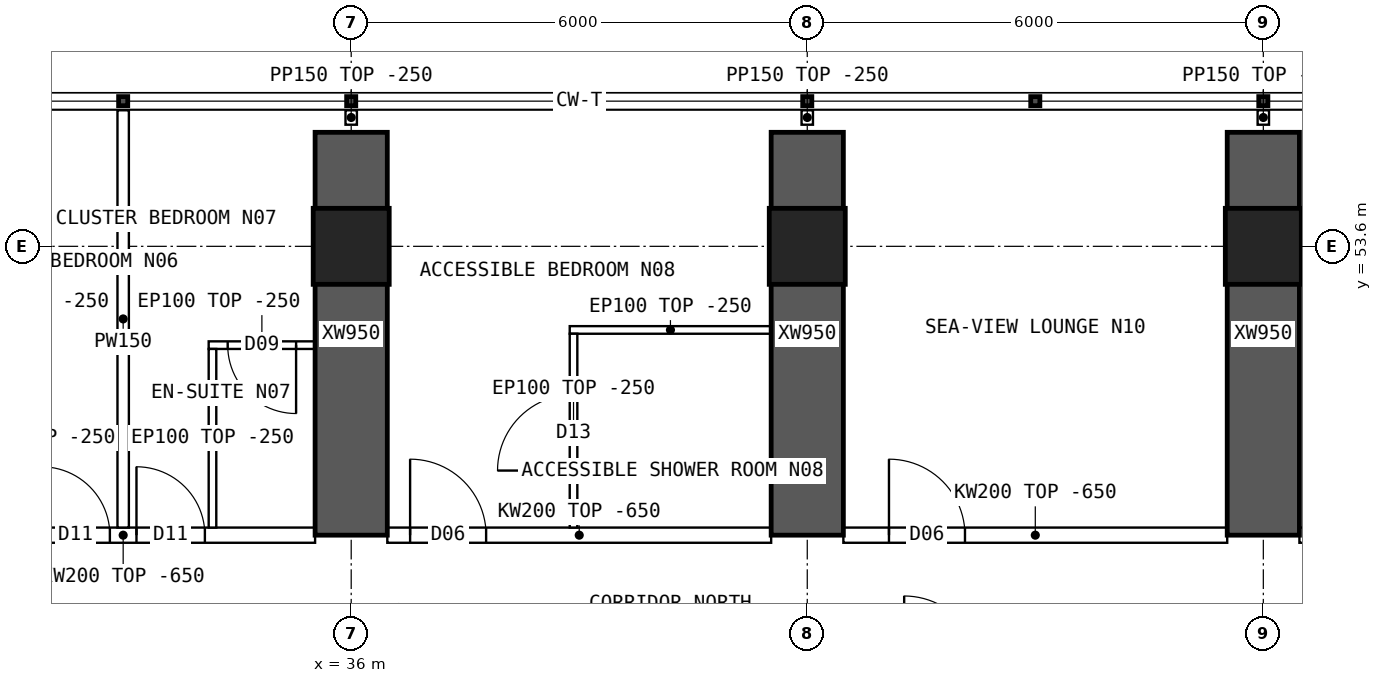
"""IFC4 building model, lengths in metres.
Left out: names, types, materials, properties, quantities, classifications, styles, units other than length and angle.
Written with IfcOpenShell. Run it as: python <this file> out.ifc"""

import sys

from ifc_helpers import new_model, si_unit, direction, frame, frame_2d, origin, origin_2d, place, context, subcontext, project, spatial, polyline, rectangle, hollow_rectangle, outline, extrude, element, fill, save


model = new_model("IFC4")
c1 = context("Model", 3, precision=1e-05, world=origin(), true_north=direction((0.0, 1.0)))
c2 = subcontext(c1, "Body", "Model", "MODEL_VIEW")
j1 = project(units=[si_unit("LENGTHUNIT", "METRE"), si_unit("PLANEANGLEUNIT", "RADIAN")], contexts=[c1])
p1 = place(None, origin())
s1 = spatial("IfcSite", under=j1, at=p1, CompositionType="ELEMENT")
p2 = place(p1, origin())
s2 = spatial("IfcBuilding", under=s1, at=p2, CompositionType="ELEMENT")
p3 = place(p2, frame((0.0, 0.0, 84.4)))
s3 = spatial("IfcBuildingStorey", under=s2, at=p3, CompositionType="ELEMENT", Elevation=84.4)
for number, where, z_axis, x_axis in (
    (1, (36.0, 53.6, 0.0), (0.0, 0.0, 1.0), (1.0, 0.0, 0.0)),
    (2, (42.0, 53.6, 0.0), (0.0, 0.0, 1.0), (1.0, 0.0, 0.0)),
    (3, (48.0, 53.6, 0.0), (0.0, 0.0, 1.0), (1.0, 0.0, 0.0)),
):
    element("IfcColumn", number, at=place(p3, frame(where, z_axis=z_axis, x_axis=x_axis)), inside=s3, PredefinedType="COLUMN", context=c2, shape_type="SweptSolid", body=[
        extrude(hollow_rectangle(XDim=1.0, YDim=1.0, WallThickness=0.1, at=origin_2d()), origin(), (0.0, 0.0, 1.0), 3.75),
    ])
for number, where, z_axis, x_axis in (
    (4, (36.0, 49.8, 0.0), (0.0, 0.0, 1.0), (0.0, 1.0, 0.0)),
    (5, (42.0, 49.8, 0.0), (0.0, 0.0, 1.0), (0.0, 1.0, 0.0)),
    (6, (48.0, 49.8, 0.0), (0.0, 0.0, 1.0), (0.0, 1.0, 0.0)),
):
    element("IfcWall", number, at=place(p3, frame(where, z_axis=z_axis, x_axis=x_axis)), inside=s3, PredefinedType="SHEAR", context=c2, shape_type="SweptSolid", body=[
        extrude(rectangle(XDim=5.3, YDim=0.95, at=frame_2d((2.65, 0.0))), origin(), (0.0, 0.0, 1.0), 3.75),
    ])
p4 = place(p3, frame((30.475, 49.8, 0.0), z_axis=(0.0, 0.0, 1.0), x_axis=(1.0, 0.0, 0.0)))
e7 = element("IfcWall", 7, at=p4, inside=s3, PredefinedType="SOLIDWALL", context=c2, shape_type="SweptSolid", body=[
    extrude(outline(polyline([(0.0, 0.0), (5.05, 0.0), (5.05, 3.1), (0.0, 3.1), (0.0, 0.0)])), frame((0.0, 0.1, 0.0), z_axis=(0.0, -1.0, 0.0), x_axis=(1.0, 0.0, 0.0)), (0.0, 0.0, 1.0), 0.2),
])
p5 = place(p4, frame((1.45, 0.0, 0.0)))
e8 = element("IfcOpeningElement", 8, at=p5, cuts=e7, PredefinedType="OPENING", context=c2, shape_type="SweptSolid", body=[
    extrude(rectangle(XDim=0.9, YDim=2.1, at=frame_2d((0.45, 1.05))), frame((0.0, 0.11, 0.0), z_axis=(0.0, -1.0, 0.0), x_axis=(1.0, 0.0, 0.0)), (0.0, 0.0, 1.0), 0.22),
])
p6 = place(p4, frame((2.7, 0.0, 0.0)))
e9 = element("IfcOpeningElement", 9, at=p6, cuts=e7, PredefinedType="OPENING", context=c2, shape_type="SweptSolid", body=[
    extrude(rectangle(XDim=0.9, YDim=2.1, at=frame_2d((0.45, 1.05))), frame((0.0, 0.11, 0.0), z_axis=(0.0, -1.0, 0.0), x_axis=(1.0, 0.0, 0.0)), (0.0, 0.0, 1.0), 0.22),
])
p7 = place(p3, frame((36.475, 49.8, 0.0), z_axis=(0.0, 0.0, 1.0), x_axis=(1.0, 0.0, 0.0)))
e10 = element("IfcWall", 10, at=p7, inside=s3, PredefinedType="SOLIDWALL", context=c2, shape_type="SweptSolid", body=[
    extrude(outline(polyline([(0.0, 0.0), (5.05, 0.0), (5.05, 3.1), (0.0, 3.1), (0.0, 0.0)])), frame((0.0, 0.1, 0.0), z_axis=(0.0, -1.0, 0.0), x_axis=(1.0, 0.0, 0.0)), (0.0, 0.0, 1.0), 0.2),
])
p8 = place(p7, frame((0.3, 0.0, 0.0)))
e11 = element("IfcOpeningElement", 11, at=p8, cuts=e10, PredefinedType="OPENING", context=c2, shape_type="SweptSolid", body=[
    extrude(rectangle(XDim=1.0, YDim=2.1, at=frame_2d((0.5, 1.05))), frame((0.0, 0.11, 0.0), z_axis=(0.0, -1.0, 0.0), x_axis=(1.0, 0.0, 0.0)), (0.0, 0.0, 1.0), 0.22),
])
p9 = place(p3, frame((42.475, 49.8, 0.0), z_axis=(0.0, 0.0, 1.0), x_axis=(1.0, 0.0, 0.0)))
e12 = element("IfcWall", 12, at=p9, inside=s3, PredefinedType="SOLIDWALL", context=c2, shape_type="SweptSolid", body=[
    extrude(outline(polyline([(0.0, 0.0), (5.05, 0.0), (5.05, 3.1), (0.0, 3.1), (0.0, 0.0)])), frame((0.0, 0.1, 0.0), z_axis=(0.0, -1.0, 0.0), x_axis=(1.0, 0.0, 0.0)), (0.0, 0.0, 1.0), 0.2),
])
p10 = place(p9, frame((0.6, 0.0, 0.0)))
e13 = element("IfcOpeningElement", 13, at=p10, cuts=e12, PredefinedType="OPENING", context=c2, shape_type="SweptSolid", body=[
    extrude(rectangle(XDim=1.0, YDim=2.1, at=frame_2d((0.5, 1.05))), frame((0.0, 0.11, 0.0), z_axis=(0.0, -1.0, 0.0), x_axis=(1.0, 0.0, 0.0)), (0.0, 0.0, 1.0), 0.22),
])
p11 = place(p3, frame((48.475, 49.8, 0.0), z_axis=(0.0, 0.0, 1.0), x_axis=(1.0, 0.0, 0.0)))
e14 = element("IfcWall", 14, at=p11, inside=s3, PredefinedType="SOLIDWALL", context=c2, shape_type="SweptSolid", body=[
    extrude(outline(polyline([(0.0, 0.0), (5.05, 0.0), (5.05, 3.1), (0.0, 3.1), (0.0, 0.0)])), frame((0.0, 0.1, 0.0), z_axis=(0.0, -1.0, 0.0), x_axis=(1.0, 0.0, 0.0)), (0.0, 0.0, 1.0), 0.2),
])
p12 = place(p11, frame((0.6, 0.0, 0.0)))
e15 = element("IfcOpeningElement", 15, at=p12, cuts=e14, PredefinedType="OPENING", context=c2, shape_type="SweptSolid", body=[
    extrude(rectangle(XDim=1.0, YDim=2.1, at=frame_2d((0.5, 1.05))), frame((0.0, 0.11, 0.0), z_axis=(0.0, -1.0, 0.0), x_axis=(1.0, 0.0, 0.0)), (0.0, 0.0, 1.0), 0.22),
])
p13 = place(p3, frame((33.0, 55.39, 0.0), z_axis=(0.0, 0.0, 1.0), x_axis=(0.0, -1.0, 0.0)))
e16 = element("IfcWall", 16, at=p13, inside=s3, PredefinedType="PARTITIONING", context=c2, shape_type="SweptSolid", body=[
    extrude(outline(polyline([(0.0, 0.0), (5.49, 0.0), (5.49, 3.1), (5.442, 3.1), (5.44, 3.5), (1.992, 3.5), (1.99, 3.1), (1.592, 3.1), (1.59, 3.5), (0.0, 3.5), (0.0, 0.0)])), frame((0.0, 0.075, 0.0), z_axis=(0.0, -1.0, 0.0), x_axis=(1.0, 0.0, 0.0)), (0.0, 0.0, 1.0), 0.15),
])
p14 = place(p3, frame((34.125, 52.3, 0.0), z_axis=(0.0, 0.0, 1.0), x_axis=(1.0, 0.0, 0.0)))
e17 = element("IfcWall", 17, at=p14, inside=s3, PredefinedType="PARTITIONING", context=c2, shape_type="SweptSolid", body=[
    extrude(rectangle(XDim=1.4, YDim=0.1, at=frame_2d((0.7, 0.0))), origin(), (0.0, 0.0, 1.0), 3.5),
])
p15 = place(p14, frame((0.25, 0.0, 0.0)))
e18 = element("IfcOpeningElement", 18, at=p15, cuts=e17, PredefinedType="OPENING", context=c2, shape_type="SweptSolid", body=[
    extrude(rectangle(XDim=0.9, YDim=2.1, at=frame_2d((0.45, 1.05))), frame((0.0, 0.06, 0.0), z_axis=(0.0, -1.0, 0.0), x_axis=(1.0, 0.0, 0.0)), (0.0, 0.0, 1.0), 0.12),
])
p16 = place(p3, frame((34.175, 52.25, 0.0), z_axis=(0.0, 0.0, 1.0), x_axis=(0.0, -1.0, 0.0)))
e19 = element("IfcWall", 19, at=p16, inside=s3, PredefinedType="PARTITIONING", context=c2, shape_type="SweptSolid", body=[
    extrude(outline(polyline([(0.0, 0.0), (2.35, 0.0), (2.35, 3.1), (2.302, 3.1), (2.3, 3.5), (0.0, 3.5), (0.0, 0.0)])), frame((0.0, 0.05, 0.0), z_axis=(0.0, -1.0, 0.0), x_axis=(1.0, 0.0, 0.0)), (0.0, 0.0, 1.0), 0.1),
])
p17 = place(p3, frame((38.875, 52.5, 0.0), z_axis=(0.0, 0.0, 1.0), x_axis=(1.0, 0.0, 0.0)))
e20 = element("IfcWall", 20, at=p17, inside=s3, PredefinedType="PARTITIONING", context=c2, shape_type="SweptSolid", body=[
    extrude(rectangle(XDim=2.65, YDim=0.1, at=frame_2d((1.325, 0.0))), origin(), (0.0, 0.0, 1.0), 3.5),
])
p18 = place(p3, frame((38.925, 52.45, 0.0), z_axis=(0.0, 0.0, 1.0), x_axis=(0.0, -1.0, 0.0)))
e21 = element("IfcWall", 21, at=p18, inside=s3, PredefinedType="PARTITIONING", context=c2, shape_type="SweptSolid", body=[
    extrude(outline(polyline([(0.0, 0.0), (2.55, 0.0), (2.55, 3.1), (2.502, 3.1), (2.5, 3.5), (0.0, 3.5), (0.0, 0.0)])), frame((0.0, 0.05, 0.0), z_axis=(0.0, -1.0, 0.0), x_axis=(1.0, 0.0, 0.0)), (0.0, 0.0, 1.0), 0.1),
])
p19 = place(p18, frame((0.8, 0.0, 0.0)))
e22 = element("IfcOpeningElement", 22, at=p19, cuts=e21, PredefinedType="OPENING", context=c2, shape_type="SweptSolid", body=[
    extrude(rectangle(XDim=1.0, YDim=2.1, at=frame_2d((0.5, 1.05))), frame((0.0, 0.06, 0.0), z_axis=(0.0, -1.0, 0.0), x_axis=(1.0, 0.0, 0.0)), (0.0, 0.0, 1.0), 0.12),
])
for number, where, z_axis, x_axis in (
    (23, (36.0, 55.2, 0.0), (0.0, 0.0, 1.0), (0.0, 1.0, 0.0)),
    (24, (42.0, 55.2, 0.0), (0.0, 0.0, 1.0), (0.0, 1.0, 0.0)),
    (25, (48.0, 55.2, 0.0), (0.0, 0.0, 1.0), (0.0, 1.0, 0.0)),
):
    element("IfcWall", number, at=place(p3, frame(where, z_axis=z_axis, x_axis=x_axis)), inside=s3, PredefinedType="PARTITIONING", context=c2, shape_type="SweptSolid", body=[
        extrude(rectangle(XDim=0.19, YDim=0.15, at=frame_2d((0.095, 0.0))), origin(), (0.0, 0.0, 1.0), 3.5),
    ])
p20 = place(p5, origin())
e26 = element("IfcDoor", 26, at=p20, inside=s3, OperationType="SINGLE_SWING_LEFT", PredefinedType="DOOR", context=c2, shape_type="SweptSolid", body=[
    extrude(rectangle(XDim=0.9, YDim=2.1, at=frame_2d((0.45, 1.05))), frame((0.0, 0.025, 0.0), z_axis=(0.0, -1.0, 0.0), x_axis=(1.0, 0.0, 0.0)), (0.0, 0.0, 1.0), 0.05),
])
fill(e8, e26)
p21 = place(p15, origin())
e27 = element("IfcDoor", 27, at=p21, inside=s3, OperationType="SINGLE_SWING_RIGHT", PredefinedType="DOOR", context=c2, shape_type="SweptSolid", body=[
    extrude(rectangle(XDim=0.9, YDim=2.1, at=frame_2d((0.45, 1.05))), frame((0.0, 0.025, 0.0), z_axis=(0.0, -1.0, 0.0), x_axis=(1.0, 0.0, 0.0)), (0.0, 0.0, 1.0), 0.05),
])
fill(e18, e27)
p22 = place(p6, origin())
e28 = element("IfcDoor", 28, at=p22, inside=s3, OperationType="SINGLE_SWING_LEFT", PredefinedType="DOOR", context=c2, shape_type="SweptSolid", body=[
    extrude(rectangle(XDim=0.9, YDim=2.1, at=frame_2d((0.45, 1.05))), frame((0.0, 0.025, 0.0), z_axis=(0.0, -1.0, 0.0), x_axis=(1.0, 0.0, 0.0)), (0.0, 0.0, 1.0), 0.05),
])
fill(e9, e28)
p23 = place(p19, origin())
e29 = element("IfcDoor", 29, at=p23, inside=s3, OperationType="SINGLE_SWING_RIGHT", PredefinedType="DOOR", context=c2, shape_type="SweptSolid", body=[
    extrude(rectangle(XDim=1.0, YDim=2.1, at=frame_2d((0.5, 1.05))), frame((0.0, 0.025, 0.0), z_axis=(0.0, -1.0, 0.0), x_axis=(1.0, 0.0, 0.0)), (0.0, 0.0, 1.0), 0.05),
])
fill(e22, e29)
p24 = place(p8, origin())
e30 = element("IfcDoor", 30, at=p24, inside=s3, OperationType="SINGLE_SWING_LEFT", PredefinedType="DOOR", context=c2, shape_type="SweptSolid", body=[
    extrude(rectangle(XDim=1.0, YDim=2.1, at=frame_2d((0.5, 1.05))), frame((0.0, 0.025, 0.0), z_axis=(0.0, -1.0, 0.0), x_axis=(1.0, 0.0, 0.0)), (0.0, 0.0, 1.0), 0.05),
])
fill(e11, e30)
p25 = place(p10, origin())
e31 = element("IfcDoor", 31, at=p25, inside=s3, OperationType="SINGLE_SWING_LEFT", PredefinedType="DOOR", context=c2, shape_type="SweptSolid", body=[
    extrude(rectangle(XDim=1.0, YDim=2.1, at=frame_2d((0.5, 1.05))), frame((0.0, 0.025, 0.0), z_axis=(0.0, -1.0, 0.0), x_axis=(1.0, 0.0, 0.0)), (0.0, 0.0, 1.0), 0.05),
])
fill(e13, e31)
save(model, sys.argv[1])
